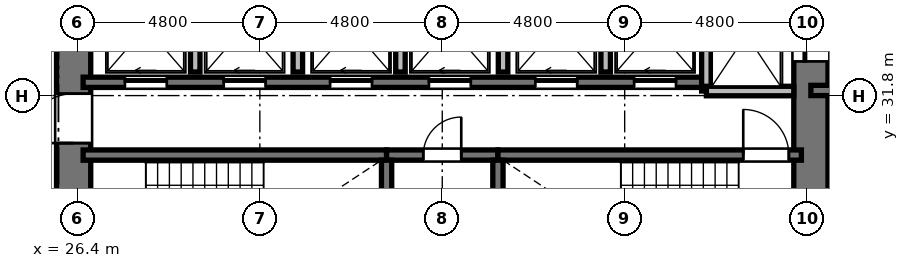
"""IFC4 building model, lengths in metres.
Left out: names, types, materials, properties, quantities, classifications, styles, units other than length and angle.
Written with IfcOpenShell. Run it as: python <this file> out.ifc"""

import sys

from ifc_helpers import new_model, si_unit, direction, frame, frame_2d, origin, place, context, subcontext, project, spatial, rectangle, extrude, element, fill, save


model = new_model("IFC4")
c1 = context("Model", 3, precision=1e-05, world=origin(), true_north=direction((0.0, 1.0)))
c2 = subcontext(c1, "Body", "Model", "MODEL_VIEW")
j1 = project(units=[si_unit("LENGTHUNIT", "METRE"), si_unit("PLANEANGLEUNIT", "RADIAN")], contexts=[c1])
p1 = place(None, origin())
s1 = spatial("IfcSite", under=j1, at=p1, CompositionType="ELEMENT")
p2 = place(p1, origin())
s2 = spatial("IfcBuilding", under=s1, at=p2, CompositionType="ELEMENT")
p3 = place(p2, frame((0.0, 0.0, 72.624)))
s3 = spatial("IfcBuildingStorey", under=s2, at=p3, CompositionType="ELEMENT", Elevation=72.624)
p4 = place(p3, frame((26.3, 20.95, 0.0), z_axis=(0.0, 0.0, 1.0), x_axis=(0.0, 1.0, 0.0)))
e1 = element("IfcWall", 1, at=p4, inside=s3, PredefinedType="SHEAR", context=c2, shape_type="SweptSolid", body=[
    extrude(rectangle(XDim=14.1, YDim=0.9, at=frame_2d((7.05, 0.0))), origin(), (0.0, 0.0, 1.0), 3.648),
])
p5 = place(p4, frame((6.5, 0.0, 0.0)))
e2 = element("IfcOpeningElement", 2, at=p5, cuts=e1, PredefinedType="OPENING", context=c2, shape_type="SweptSolid", body=[
    extrude(rectangle(XDim=1.2, YDim=2.15, at=frame_2d((0.6, 1.075))), frame((0.0, 0.46, 0.0), z_axis=(0.0, -1.0, 0.0), x_axis=(1.0, 0.0, 0.0)), (0.0, 0.0, 1.0), 0.92),
])
p6 = place(p4, frame((9.6, 0.0, 0.0)))
e3 = element("IfcOpeningElement", 3, at=p6, cuts=e1, PredefinedType="OPENING", context=c2, shape_type="SweptSolid", body=[
    extrude(rectangle(XDim=1.3, YDim=2.2, at=frame_2d((0.65, 1.1))), frame((0.0, 0.46, 0.0), z_axis=(0.0, -1.0, 0.0), x_axis=(1.0, 0.0, 0.0)), (0.0, 0.0, 1.0), 0.92),
])
p7 = place(p4, frame((3.26, 0.0, 0.0)))
e4 = element("IfcOpeningElement", 4, at=p7, cuts=e1, PredefinedType="OPENING", context=c2, shape_type="SweptSolid", body=[
    extrude(rectangle(XDim=1.3, YDim=2.2, at=frame_2d((0.65, 1.1))), frame((0.0, 0.46, 0.0), z_axis=(0.0, -1.0, 0.0), x_axis=(1.0, 0.0, 0.0)), (0.0, 0.0, 1.0), 0.92),
])
p8 = place(p3, frame((45.7, 20.95, 0.0), z_axis=(0.0, 0.0, 1.0), x_axis=(0.0, 1.0, 0.0)))
e5 = element("IfcWall", 5, at=p8, inside=s3, PredefinedType="SHEAR", context=c2, shape_type="SweptSolid", body=[
    extrude(rectangle(XDim=14.1, YDim=0.9, at=frame_2d((7.05, 0.0))), origin(), (0.0, 0.0, 1.0), 3.648),
])
p9 = place(p8, frame((11.75, 0.0, 0.0)))
e6 = element("IfcOpeningElement", 6, at=p9, cuts=e5, PredefinedType="OPENING", context=c2, shape_type="SweptSolid", body=[
    extrude(rectangle(XDim=1.4, YDim=2.3, at=frame_2d((0.7, 1.15))), frame((0.0, 0.46, 0.0), z_axis=(0.0, -1.0, 0.0), x_axis=(1.0, 0.0, 0.0)), (0.0, 0.0, 1.0), 0.92),
])
p10 = place(p8, frame((0.95, 0.0, 0.0)))
e7 = element("IfcOpeningElement", 7, at=p10, cuts=e5, PredefinedType="OPENING", context=c2, shape_type="SweptSolid", body=[
    extrude(rectangle(XDim=1.4, YDim=2.3, at=frame_2d((0.7, 1.15))), frame((0.0, 0.46, 0.0), z_axis=(0.0, -1.0, 0.0), x_axis=(1.0, 0.0, 0.0)), (0.0, 0.0, 1.0), 0.92),
])
p11 = place(p3, frame((26.55, 30.235, 0.0), z_axis=(0.0, 0.0, 1.0), x_axis=(1.0, 0.0, 0.0)))
e8 = element("IfcWall", 8, at=p11, inside=s3, PredefinedType="SHEAR", context=c2, shape_type="SweptSolid", body=[
    extrude(rectangle(XDim=7.985, YDim=0.27, at=frame_2d((3.992, 0.0))), origin(), (0.0, 0.0, 1.0), 3.648),
])
p12 = place(p3, frame((34.535, 30.235, 0.0), z_axis=(0.0, 0.0, 1.0), x_axis=(1.0, 0.0, 0.0)))
e9 = element("IfcWall", 9, at=p12, inside=s3, PredefinedType="SHEAR", context=c2, shape_type="SweptSolid", body=[
    extrude(rectangle(XDim=2.93, YDim=0.27, at=frame_2d((1.465, 0.0))), origin(), (0.0, 0.0, 1.0), 3.648),
])
p13 = place(p12, frame((0.965, 0.0, 0.0)))
e10 = element("IfcOpeningElement", 10, at=p13, cuts=e9, PredefinedType="OPENING", context=c2, shape_type="SweptSolid", body=[
    extrude(rectangle(XDim=1.0, YDim=2.1, at=frame_2d((0.5, 1.05))), frame((0.0, 0.145, 0.0), z_axis=(0.0, -1.0, 0.0), x_axis=(1.0, 0.0, 0.0)), (0.0, 0.0, 1.0), 0.29),
])
p14 = place(p3, frame((37.465, 30.235, 0.0), z_axis=(0.0, 0.0, 1.0), x_axis=(1.0, 0.0, 0.0)))
e11 = element("IfcWall", 11, at=p14, inside=s3, PredefinedType="SHEAR", context=c2, shape_type="SweptSolid", body=[
    extrude(rectangle(XDim=7.985, YDim=0.27, at=frame_2d((3.992, 0.0))), origin(), (0.0, 0.0, 1.0), 3.648),
])
p15 = place(p14, frame((6.455, 0.0, 0.0)))
e12 = element("IfcOpeningElement", 12, at=p15, cuts=e11, PredefinedType="OPENING", context=c2, shape_type="SweptSolid", body=[
    extrude(rectangle(XDim=1.2, YDim=2.15, at=frame_2d((0.6, 1.075))), frame((0.0, 0.145, 0.0), z_axis=(0.0, -1.0, 0.0), x_axis=(1.0, 0.0, 0.0)), (0.0, 0.0, 1.0), 0.29),
])
for number, where, z_axis, x_axis in (
    (13, (34.535, 26.02, 0.0), (0.0, 0.0, 1.0), (0.0, 1.0, 0.0)),
    (14, (37.465, 26.02, 0.0), (0.0, 0.0, 1.0), (0.0, 1.0, 0.0)),
):
    element("IfcWall", number, at=place(p3, frame(where, z_axis=z_axis, x_axis=x_axis)), inside=s3, PredefinedType="SHEAR", context=c2, shape_type="SweptSolid", body=[
        extrude(rectangle(XDim=4.08, YDim=0.27, at=frame_2d((2.04, 0.0))), origin(), (0.0, 0.0, 1.0), 3.648),
    ])
p16 = place(p3, frame((26.55, 32.15, 0.0), z_axis=(0.0, 0.0, 1.0), x_axis=(1.0, 0.0, 0.0)))
e15 = element("IfcWall", 15, at=p16, inside=s3, PredefinedType="SHEAR", context=c2, shape_type="SweptSolid", body=[
    extrude(rectangle(XDim=16.4, YDim=0.27, at=frame_2d((8.2, 0.0))), origin(), (0.0, 0.0, 1.0), 3.648),
])
p17 = place(p16, frame((1.1, 0.0, 0.0)))
e16 = element("IfcOpeningElement", 16, at=p17, cuts=e15, PredefinedType="OPENING", context=c2, shape_type="SweptSolid", body=[
    extrude(rectangle(XDim=1.1, YDim=2.2, at=frame_2d((0.55, 1.1))), frame((0.0, 0.145, 0.0), z_axis=(0.0, -1.0, 0.0), x_axis=(1.0, 0.0, 0.0)), (0.0, 0.0, 1.0), 0.29),
])
p18 = place(p16, frame((3.7, 0.0, 0.0)))
e17 = element("IfcOpeningElement", 17, at=p18, cuts=e15, PredefinedType="OPENING", context=c2, shape_type="SweptSolid", body=[
    extrude(rectangle(XDim=1.1, YDim=2.2, at=frame_2d((0.55, 1.1))), frame((0.0, 0.145, 0.0), z_axis=(0.0, -1.0, 0.0), x_axis=(1.0, 0.0, 0.0)), (0.0, 0.0, 1.0), 0.29),
])
p19 = place(p16, frame((6.5, 0.0, 0.0)))
e18 = element("IfcOpeningElement", 18, at=p19, cuts=e15, PredefinedType="OPENING", context=c2, shape_type="SweptSolid", body=[
    extrude(rectangle(XDim=1.1, YDim=2.2, at=frame_2d((0.55, 1.1))), frame((0.0, 0.145, 0.0), z_axis=(0.0, -1.0, 0.0), x_axis=(1.0, 0.0, 0.0)), (0.0, 0.0, 1.0), 0.29),
])
p20 = place(p16, frame((9.1, 0.0, 0.0)))
e19 = element("IfcOpeningElement", 19, at=p20, cuts=e15, PredefinedType="OPENING", context=c2, shape_type="SweptSolid", body=[
    extrude(rectangle(XDim=1.1, YDim=2.2, at=frame_2d((0.55, 1.1))), frame((0.0, 0.145, 0.0), z_axis=(0.0, -1.0, 0.0), x_axis=(1.0, 0.0, 0.0)), (0.0, 0.0, 1.0), 0.29),
])
p21 = place(p16, frame((11.9, 0.0, 0.0)))
e20 = element("IfcOpeningElement", 20, at=p21, cuts=e15, PredefinedType="OPENING", context=c2, shape_type="SweptSolid", body=[
    extrude(rectangle(XDim=1.1, YDim=2.2, at=frame_2d((0.55, 1.1))), frame((0.0, 0.145, 0.0), z_axis=(0.0, -1.0, 0.0), x_axis=(1.0, 0.0, 0.0)), (0.0, 0.0, 1.0), 0.29),
])
p22 = place(p16, frame((14.5, 0.0, 0.0)))
e21 = element("IfcOpeningElement", 21, at=p22, cuts=e15, PredefinedType="OPENING", context=c2, shape_type="SweptSolid", body=[
    extrude(rectangle(XDim=1.1, YDim=2.2, at=frame_2d((0.55, 1.1))), frame((0.0, 0.145, 0.0), z_axis=(0.0, -1.0, 0.0), x_axis=(1.0, 0.0, 0.0)), (0.0, 0.0, 1.0), 0.29),
])
p23 = place(p3, frame((42.95, 31.92, 0.0), z_axis=(0.0, 0.0, 1.0), x_axis=(0.0, 1.0, 0.0)))
e22 = element("IfcWall", 22, at=p23, inside=s3, PredefinedType="SOLIDWALL", context=c2, shape_type="SweptSolid", body=[
    extrude(rectangle(XDim=3.18, YDim=0.25, at=frame_2d((1.59, 0.0))), origin(), (0.0, 0.0, 1.0), 3.198),
])
p24 = place(p3, frame((42.95, 31.92, 0.0), z_axis=(0.0, 0.0, 1.0), x_axis=(1.0, 0.0, 0.0)))
e23 = element("IfcWall", 23, at=p24, inside=s3, PredefinedType="SOLIDWALL", context=c2, shape_type="SweptSolid", body=[
    extrude(rectangle(XDim=2.3, YDim=0.25, at=frame_2d((1.15, 0.0))), origin(), (0.0, 0.0, 1.0), 3.198),
])
for number, where, z_axis, x_axis in (
    (24, (29.5, 32.42, 0.0), (0.0, 0.0, 1.0), (0.0, 1.0, 0.0)),
    (25, (32.2, 32.42, 0.0), (0.0, 0.0, 1.0), (0.0, 1.0, 0.0)),
    (26, (34.9, 32.42, 0.0), (0.0, 0.0, 1.0), (0.0, 1.0, 0.0)),
    (27, (37.6, 32.42, 0.0), (0.0, 0.0, 1.0), (0.0, 1.0, 0.0)),
    (28, (40.3, 32.42, 0.0), (0.0, 0.0, 1.0), (0.0, 1.0, 0.0)),
):
    element("IfcWall", number, at=place(p3, frame(where, z_axis=z_axis, x_axis=x_axis)), inside=s3, PredefinedType="SOLIDWALL", context=c2, shape_type="SweptSolid", body=[
        extrude(rectangle(XDim=2.68, YDim=0.25, at=frame_2d((1.34, 0.0))), origin(), (0.0, 0.0, 1.0), 3.198),
    ])
p25 = place(p3, frame((45.7, 31.935, 0.0), z_axis=(0.0, 0.0, 1.0), x_axis=(1.0, 0.0, 0.0)))
e29 = element("IfcWall", 29, at=p25, inside=s3, PredefinedType="SHEAR", context=c2, shape_type="SweptSolid", body=[
    extrude(rectangle(XDim=4.715, YDim=0.27, at=frame_2d((2.357, 0.0))), origin(), (0.0, 0.0, 1.0), 3.648),
])
p26 = place(p15, origin())
e30 = element("IfcDoor", 30, at=p26, inside=s3, OperationType="SINGLE_SWING_LEFT", PredefinedType="DOOR", context=c2, shape_type="SweptSolid", body=[
    extrude(rectangle(XDim=1.2, YDim=2.15, at=frame_2d((0.6, 1.075))), frame((0.0, 0.025, 0.0), z_axis=(0.0, -1.0, 0.0), x_axis=(1.0, 0.0, 0.0)), (0.0, 0.0, 1.0), 0.05),
])
fill(e12, e30)
p27 = place(p13, origin())
e31 = element("IfcDoor", 31, at=p27, inside=s3, OperationType="SINGLE_SWING_RIGHT", PredefinedType="DOOR", context=c2, shape_type="SweptSolid", body=[
    extrude(rectangle(XDim=1.0, YDim=2.1, at=frame_2d((0.5, 1.05))), frame((0.0, 0.025, 0.0), z_axis=(0.0, -1.0, 0.0), x_axis=(1.0, 0.0, 0.0)), (0.0, 0.0, 1.0), 0.05),
])
fill(e10, e31)
p28 = place(p6, origin())
e32 = element("IfcDoor", 32, at=p28, inside=s3, OperationType="SINGLE_SWING_LEFT", PredefinedType="DOOR", context=c2, shape_type="SweptSolid", body=[
    extrude(rectangle(XDim=1.3, YDim=2.2, at=frame_2d((0.65, 1.1))), frame((0.0, 0.025, 0.0), z_axis=(0.0, -1.0, 0.0), x_axis=(1.0, 0.0, 0.0)), (0.0, 0.0, 1.0), 0.05),
])
fill(e3, e32)
p29 = place(p17, origin())
e33 = element("IfcDoor", 33, at=p29, inside=s3, OperationType="SLIDING_TO_LEFT", PredefinedType="DOOR", context=c2, shape_type="SweptSolid", body=[
    extrude(rectangle(XDim=1.1, YDim=2.2, at=frame_2d((0.55, 1.1))), frame((0.0, 0.025, 0.0), z_axis=(0.0, -1.0, 0.0), x_axis=(1.0, 0.0, 0.0)), (0.0, 0.0, 1.0), 0.05),
])
fill(e16, e33)
p30 = place(p18, origin())
e34 = element("IfcDoor", 34, at=p30, inside=s3, OperationType="SLIDING_TO_LEFT", PredefinedType="DOOR", context=c2, shape_type="SweptSolid", body=[
    extrude(rectangle(XDim=1.1, YDim=2.2, at=frame_2d((0.55, 1.1))), frame((0.0, 0.025, 0.0), z_axis=(0.0, -1.0, 0.0), x_axis=(1.0, 0.0, 0.0)), (0.0, 0.0, 1.0), 0.05),
])
fill(e17, e34)
p31 = place(p19, origin())
e35 = element("IfcDoor", 35, at=p31, inside=s3, OperationType="SLIDING_TO_LEFT", PredefinedType="DOOR", context=c2, shape_type="SweptSolid", body=[
    extrude(rectangle(XDim=1.1, YDim=2.2, at=frame_2d((0.55, 1.1))), frame((0.0, 0.025, 0.0), z_axis=(0.0, -1.0, 0.0), x_axis=(1.0, 0.0, 0.0)), (0.0, 0.0, 1.0), 0.05),
])
fill(e18, e35)
p32 = place(p20, origin())
e36 = element("IfcDoor", 36, at=p32, inside=s3, OperationType="SLIDING_TO_LEFT", PredefinedType="DOOR", context=c2, shape_type="SweptSolid", body=[
    extrude(rectangle(XDim=1.1, YDim=2.2, at=frame_2d((0.55, 1.1))), frame((0.0, 0.025, 0.0), z_axis=(0.0, -1.0, 0.0), x_axis=(1.0, 0.0, 0.0)), (0.0, 0.0, 1.0), 0.05),
])
fill(e19, e36)
p33 = place(p21, origin())
e37 = element("IfcDoor", 37, at=p33, inside=s3, OperationType="SLIDING_TO_LEFT", PredefinedType="DOOR", context=c2, shape_type="SweptSolid", body=[
    extrude(rectangle(XDim=1.1, YDim=2.2, at=frame_2d((0.55, 1.1))), frame((0.0, 0.025, 0.0), z_axis=(0.0, -1.0, 0.0), x_axis=(1.0, 0.0, 0.0)), (0.0, 0.0, 1.0), 0.05),
])
fill(e20, e37)
p34 = place(p22, origin())
e38 = element("IfcDoor", 38, at=p34, inside=s3, OperationType="SLIDING_TO_LEFT", PredefinedType="DOOR", context=c2, shape_type="SweptSolid", body=[
    extrude(rectangle(XDim=1.1, YDim=2.2, at=frame_2d((0.55, 1.1))), frame((0.0, 0.025, 0.0), z_axis=(0.0, -1.0, 0.0), x_axis=(1.0, 0.0, 0.0)), (0.0, 0.0, 1.0), 0.05),
])
fill(e21, e38)
p35 = place(p9, origin())
e39 = element("IfcDoor", 39, at=p35, inside=s3, OperationType="SLIDING_TO_LEFT", PredefinedType="DOOR", context=c2, shape_type="SweptSolid", body=[
    extrude(rectangle(XDim=1.4, YDim=2.3, at=frame_2d((0.7, 1.15))), frame((0.0, 0.025, 0.0), z_axis=(0.0, -1.0, 0.0), x_axis=(1.0, 0.0, 0.0)), (0.0, 0.0, 1.0), 0.05),
])
fill(e6, e39)
save(model, sys.argv[1])
